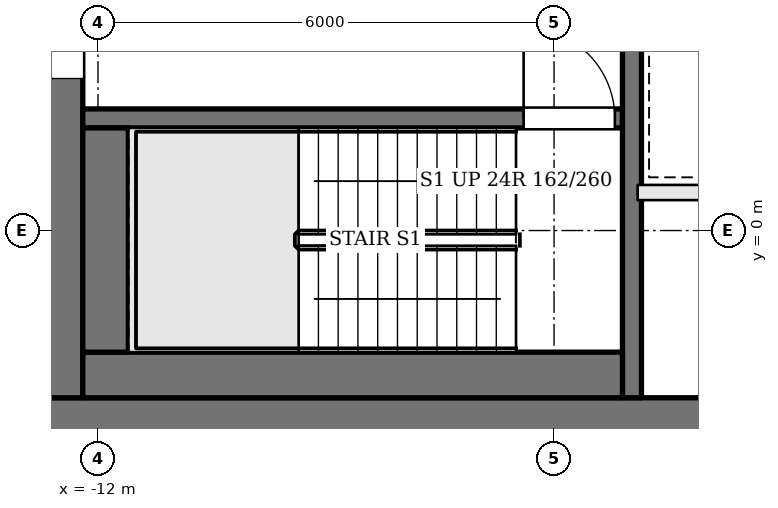
"""IFC4 building model, lengths in metres.
Left out: names, types, materials, properties, quantities, classifications, styles, units other than length and angle.
Written with IfcOpenShell. Run it as: python <this file> out.ifc"""

import sys

from ifc_helpers import new_model, si_unit, direction, frame, frame_2d, origin, place, context, subcontext, project, spatial, rectangle, extrude, element, fill, save


model = new_model("IFC4")
c1 = context("Model", 3, precision=1e-05, world=origin(), true_north=direction((0.0, 1.0)))
c2 = subcontext(c1, "Body", "Model", "MODEL_VIEW")
j1 = project(units=[si_unit("LENGTHUNIT", "METRE"), si_unit("PLANEANGLEUNIT", "RADIAN")], contexts=[c1])
p1 = place(None, origin())
s1 = spatial("IfcSite", under=j1, at=p1, CompositionType="ELEMENT")
p2 = place(p1, origin())
s2 = spatial("IfcBuilding", under=s1, at=p2, CompositionType="ELEMENT")
p3 = place(p2, frame((0.0, 0.0, 288.3)))
s3 = spatial("IfcBuildingStorey", under=s2, at=p3, CompositionType="ELEMENT", Elevation=288.3)
p4 = place(p3, frame((-13.0, -2.6, 0.0), z_axis=(0.0, 0.0, 1.0), x_axis=(1.0, 0.0, 0.0)))
e1 = element("IfcWall", 1, at=p4, inside=s3, PredefinedType="SHEAR", context=c2, shape_type="SweptSolid", body=[
    extrude(rectangle(XDim=26.0, YDim=0.8, at=frame_2d((13.0, 0.0))), origin(), (0.0, 0.0, 1.0), 3.9),
])
p5 = place(p4, frame((9.275, 0.0, 0.0)))
e2 = element("IfcOpeningElement", 2, at=p5, cuts=e1, PredefinedType="OPENING", context=c2, shape_type="SweptSolid", body=[
    extrude(rectangle(XDim=0.9, YDim=2.1, at=frame_2d((0.45, 1.05))), frame((0.0, 0.41, 0.0), z_axis=(0.0, -1.0, 0.0), x_axis=(1.0, 0.0, 0.0)), (0.0, 0.0, 1.0), 0.82),
])
p6 = place(p4, frame((11.75, 0.0, 0.0)))
e3 = element("IfcOpeningElement", 3, at=p6, cuts=e1, PredefinedType="OPENING", context=c2, shape_type="SweptSolid", body=[
    extrude(rectangle(XDim=1.0, YDim=2.1, at=frame_2d((0.5, 1.05))), frame((0.0, 0.41, 0.0), z_axis=(0.0, -1.0, 0.0), x_axis=(1.0, 0.0, 0.0)), (0.0, 0.0, 1.0), 0.82),
])
p7 = place(p4, frame((14.325, 0.0, 0.0)))
e4 = element("IfcOpeningElement", 4, at=p7, cuts=e1, PredefinedType="OPENING", context=c2, shape_type="SweptSolid", body=[
    extrude(rectangle(XDim=0.9, YDim=2.1, at=frame_2d((0.45, 1.05))), frame((0.0, 0.41, 0.0), z_axis=(0.0, -1.0, 0.0), x_axis=(1.0, 0.0, 0.0)), (0.0, 0.0, 1.0), 0.82),
])
p8 = place(p4, frame((16.7, 0.0, 0.0)))
e5 = element("IfcOpeningElement", 5, at=p8, cuts=e1, PredefinedType="OPENING", context=c2, shape_type="SweptSolid", body=[
    extrude(rectangle(XDim=0.9, YDim=2.1, at=frame_2d((0.45, 1.05))), frame((0.0, 0.41, 0.0), z_axis=(0.0, -1.0, 0.0), x_axis=(1.0, 0.0, 0.0)), (0.0, 0.0, 1.0), 0.82),
])
p9 = place(p3, frame((-12.6, -2.2, 0.0), z_axis=(0.0, 0.0, 1.0), x_axis=(0.0, 1.0, 0.0)))
e6 = element("IfcWall", 6, at=p9, inside=s3, PredefinedType="SHEAR", context=c2, shape_type="SweptSolid", body=[
    extrude(rectangle(XDim=13.4, YDim=0.8, at=frame_2d((6.7, 0.0))), origin(), (0.0, 0.0, 1.0), 3.9),
])
p10 = place(p9, frame((4.2, 0.0, 0.0)))
e7 = element("IfcOpeningElement", 7, at=p10, cuts=e6, PredefinedType="OPENING", context=c2, shape_type="SweptSolid", body=[
    extrude(rectangle(XDim=1.8, YDim=2.1, at=frame_2d((0.9, 1.05))), frame((0.0, 0.41, 0.0), z_axis=(0.0, -1.0, 0.0), x_axis=(1.0, 0.0, 0.0)), (0.0, 0.0, 1.0), 0.82),
])
p11 = place(p3, frame((-12.2, 1.475, 0.0), z_axis=(0.0, 0.0, 1.0), x_axis=(1.0, 0.0, 0.0)))
e8 = element("IfcWall", 8, at=p11, inside=s3, PredefinedType="SOLIDWALL", context=c2, shape_type="SweptSolid", body=[
    extrude(rectangle(XDim=7.1, YDim=0.25, at=frame_2d((3.55, 0.0))), origin(), (0.0, 0.0, 1.0), 3.7),
])
p12 = place(p11, frame((5.8, 0.0, 0.0)))
e9 = element("IfcOpeningElement", 9, at=p12, cuts=e8, PredefinedType="OPENING", context=c2, shape_type="SweptSolid", body=[
    extrude(rectangle(XDim=1.2, YDim=2.1, at=frame_2d((0.6, 1.05))), frame((0.0, 0.135, 0.0), z_axis=(0.0, -1.0, 0.0), x_axis=(1.0, 0.0, 0.0)), (0.0, 0.0, 1.0), 0.27),
])
p13 = place(p3, frame((-4.975, -2.2, 0.0), z_axis=(0.0, 0.0, 1.0), x_axis=(0.0, 1.0, 0.0)))
e10 = element("IfcWall", 10, at=p13, inside=s3, PredefinedType="SOLIDWALL", context=c2, shape_type="SweptSolid", body=[
    extrude(rectangle(XDim=13.4, YDim=0.25, at=frame_2d((6.7, 0.0))), origin(), (0.0, 0.0, 1.0), 3.7),
])
p14 = place(p13, frame((5.25, 0.0, 0.0)))
e11 = element("IfcOpeningElement", 11, at=p14, cuts=e10, PredefinedType="OPENING", context=c2, shape_type="SweptSolid", body=[
    extrude(rectangle(XDim=1.2, YDim=2.1, at=frame_2d((0.6, 1.05))), frame((0.0, 0.135, 0.0), z_axis=(0.0, -1.0, 0.0), x_axis=(1.0, 0.0, 0.0)), (0.0, 0.0, 1.0), 0.27),
])
p15 = place(p3, frame((-12.2, -1.9, 0.0), z_axis=(0.0, 0.0, 1.0), x_axis=(1.0, 0.0, 0.0)))
e12 = element("IfcWall", 12, at=p15, inside=s3, PredefinedType="SOLIDWALL", context=c2, shape_type="SweptSolid", body=[
    extrude(rectangle(XDim=7.1, YDim=0.6, at=frame_2d((3.55, 0.0))), origin(), (0.0, 0.0, 1.0), 3.7),
])
p16 = place(p3, frame((-11.9, -1.6, 0.0), z_axis=(0.0, 0.0, 1.0), x_axis=(0.0, 1.0, 0.0)))
e13 = element("IfcWall", 13, at=p16, inside=s3, PredefinedType="SOLIDWALL", context=c2, shape_type="SweptSolid", body=[
    extrude(rectangle(XDim=2.95, YDim=0.6, at=frame_2d((1.475, 0.0))), origin(), (0.0, 0.0, 1.0), 3.7),
])
p17 = place(p3, frame((-4.9, 0.5, 0.0), z_axis=(0.0, 0.0, 1.0), x_axis=(1.0, 0.0, 0.0)))
e14 = element("IfcWall", 14, at=p17, inside=s3, PredefinedType="SOLIDWALL", context=c2, shape_type="SweptSolid", body=[
    extrude(rectangle(XDim=9.8, YDim=0.2, at=frame_2d((4.9, 0.0))), origin(), (0.0, 0.0, 1.0), 3.7),
])
p18 = place(p10, origin())
e15 = element("IfcDoor", 15, at=p18, inside=s3, OperationType="DOUBLE_DOOR_SINGLE_SWING", PredefinedType="DOOR", context=c2, shape_type="SweptSolid", body=[
    extrude(rectangle(XDim=1.8, YDim=2.1, at=frame_2d((0.9, 1.05))), frame((0.0, 0.025, 0.0), z_axis=(0.0, -1.0, 0.0), x_axis=(1.0, 0.0, 0.0)), (0.0, 0.0, 1.0), 0.05),
])
fill(e7, e15)
p19 = place(p12, origin())
e16 = element("IfcDoor", 16, at=p19, inside=s3, OperationType="SINGLE_SWING_LEFT", PredefinedType="DOOR", context=c2, shape_type="SweptSolid", body=[
    extrude(rectangle(XDim=1.2, YDim=2.1, at=frame_2d((0.6, 1.05))), frame((0.0, 0.025, 0.0), z_axis=(0.0, -1.0, 0.0), x_axis=(1.0, 0.0, 0.0)), (0.0, 0.0, 1.0), 0.05),
])
fill(e9, e16)
save(model, sys.argv[1])
